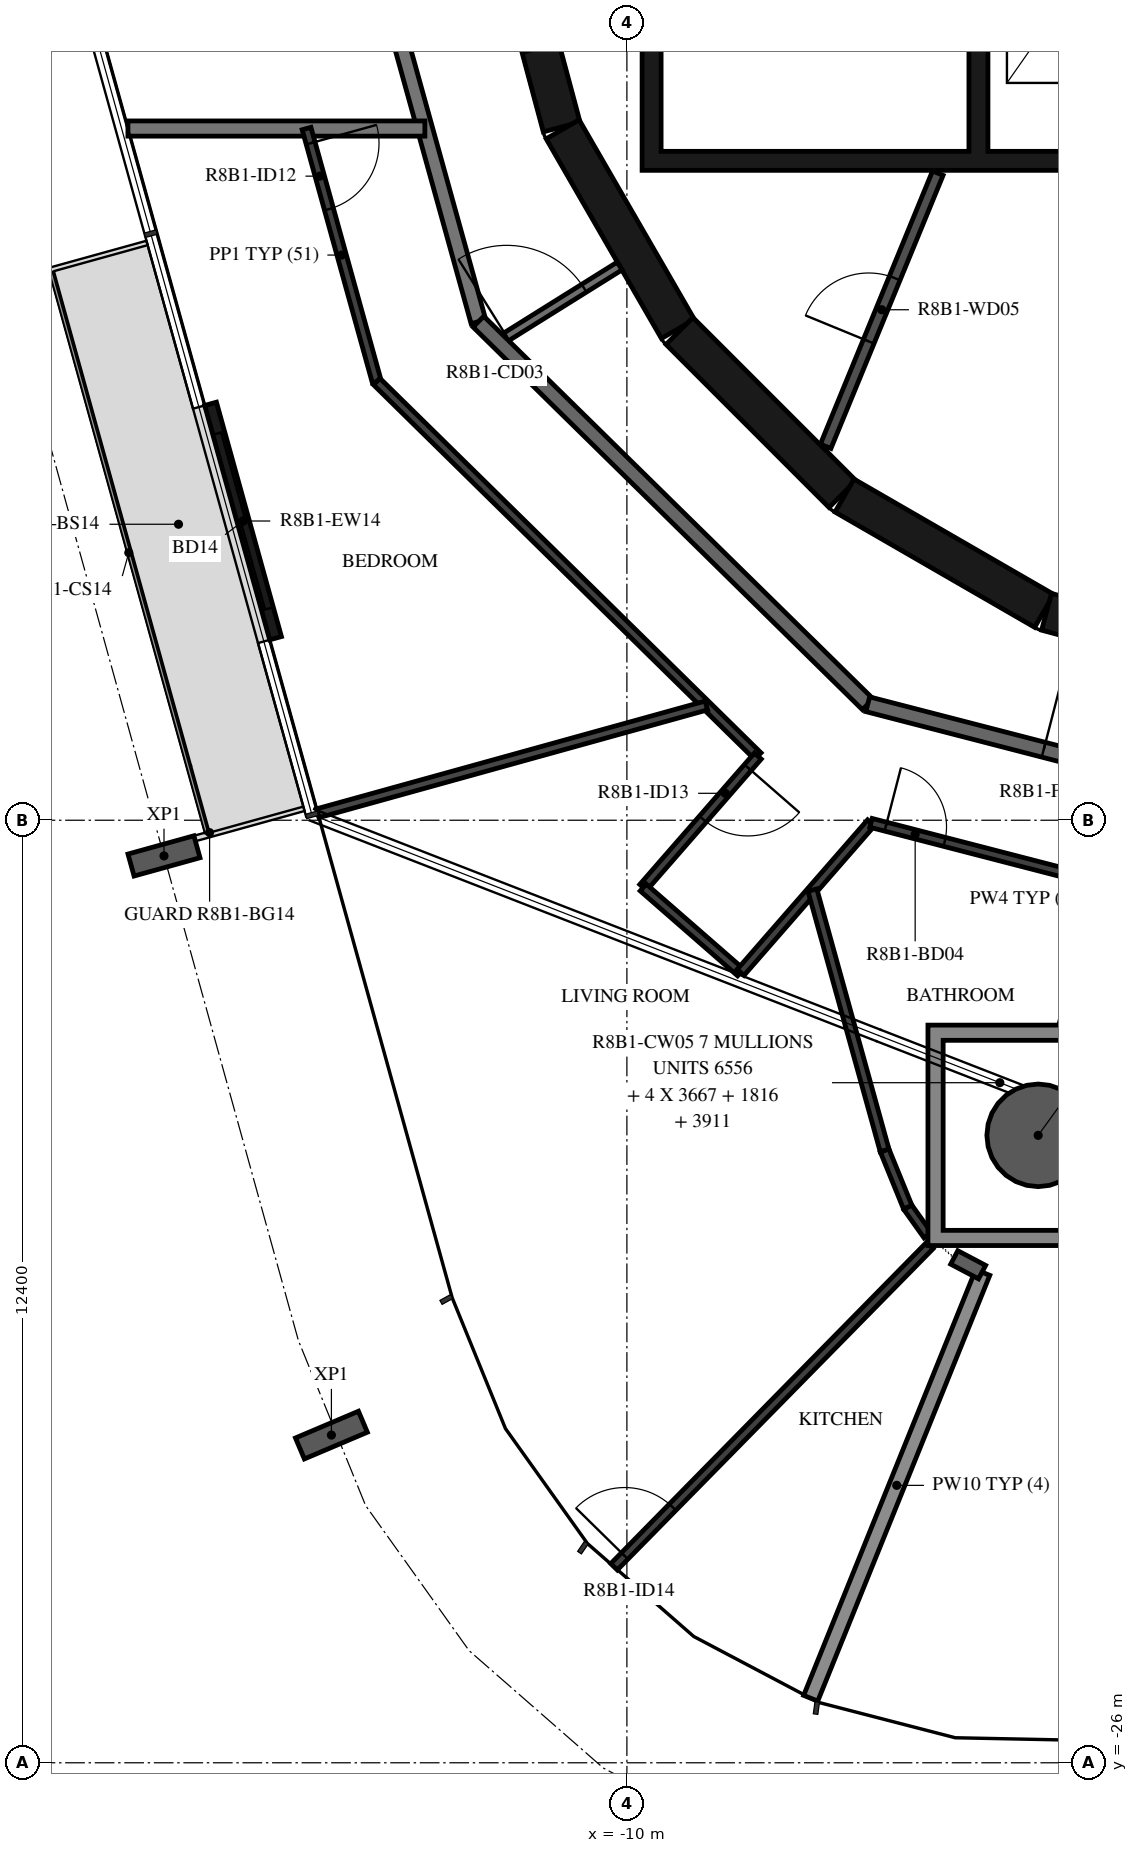
"""IFC4 building model, lengths in metres.
Left out: names, types, materials, properties, quantities, classifications, styles, units other than length and angle.
Written with IfcOpenShell. Run it as: python <this file> out.ifc"""

import sys

from ifc_helpers import new_model, si_unit, direction, frame, frame_2d, origin, origin_2d, place, context, subcontext, project, spatial, polyline, rectangle, hollow_circle, i_section, outline, extrude, element, fill, save


model = new_model("IFC4")
c1 = context("Model", 3, precision=1e-05, world=origin(), true_north=direction((0.0, 1.0)))
c2 = subcontext(c1, "Body", "Model", "MODEL_VIEW")
j1 = project(units=[si_unit("LENGTHUNIT", "METRE"), si_unit("PLANEANGLEUNIT", "RADIAN")], contexts=[c1])
p1 = place(None, origin())
s1 = spatial("IfcSite", under=j1, at=p1, CompositionType="ELEMENT")
p2 = place(p1, origin())
s2 = spatial("IfcBuilding", under=s1, at=p2, CompositionType="ELEMENT")
p3 = place(p2, frame((0.0, 0.0, 308.7)))
s3 = spatial("IfcBuildingStorey", under=s2, at=p3, CompositionType="ELEMENT", Elevation=308.7)
p4 = place(p3, frame((-4.589, -17.745, -0.38), z_axis=(0.0, 0.0, 1.0), x_axis=(1.0, 0.0, 0.0)))
e1 = element("IfcColumn", 1, at=p4, inside=s3, PredefinedType="COLUMN", context=c2, shape_type="SweptSolid", body=[
    extrude(hollow_circle(Radius=0.675, WallThickness=0.03, at=origin_2d()), origin(), (0.0, 0.0, 1.0), 3.5),
])
for number, where, z_axis, x_axis in (
    (2, (-16.09, -14.069, -0.38), (0.0, 0.0, 1.0), (-0.267, 0.964, 0.0)),
    (3, (-13.887, -21.689, -0.38), (0.0, 0.0, 1.0), (-0.39, 0.921, 0.0)),
):
    element("IfcColumn", number, at=place(p3, frame(where, z_axis=z_axis, x_axis=x_axis)), inside=s3, PredefinedType="COLUMN", context=c2, shape_type="SweptSolid", body=[
        extrude(i_section(OverallWidth=0.3, OverallDepth=0.9, WebThickness=0.019, FlangeThickness=0.035, FilletRadius=0.03, at=origin_2d()), origin(), (0.0, 0.0, 1.0), 3.5),
    ])
p5 = place(p3, frame((-15.477, -8.122, 0.0), z_axis=(0.0, 0.0, 1.0), x_axis=(0.267195229387, -0.963642417805, 0.0)))
e4 = element("IfcWall", 4, at=p5, inside=s3, PredefinedType="STANDARD", context=c2, shape_type="SweptSolid", body=[
    extrude(rectangle(XDim=3.2, YDim=0.16, at=frame_2d((1.6, 0.0))), origin(), (0.0, 0.0, 1.0), 3.12),
])
p6 = place(p5, frame((0.4, 0.0, 0.0)))
e5 = element("IfcOpeningElement", 5, at=p6, cuts=e4, PredefinedType="OPENING", context=c2, shape_type="SweptSolid", body=[
    extrude(rectangle(XDim=2.4, YDim=2.4, at=frame_2d((1.2, 1.2))), frame((0.0, 0.09, 0.0), z_axis=(0.0, -1.0, 0.0), x_axis=(1.0, 0.0, 0.0)), (0.0, 0.0, 1.0), 0.18),
])
p7 = place(p3, frame((-11.643, -1.55, 0.0), z_axis=(0.0, 0.0, 1.0), x_axis=(0.258734743916, -0.965948410781, 0.0)))
e6 = element("IfcWall", 6, at=p7, inside=s3, PredefinedType="SHEAR", context=c2, shape_type="SweptSolid", body=[
    extrude(rectangle(XDim=3.033, YDim=0.5, at=frame_2d((1.516, 0.0))), origin(), (0.0, 0.0, 1.0), 3.12),
])
p8 = place(p7, frame((1.066, 0.0, 0.0)))
e7 = element("IfcOpeningElement", 7, at=p8, cuts=e6, PredefinedType="OPENING", context=c2, shape_type="SweptSolid", body=[
    extrude(rectangle(XDim=0.9, YDim=2.1, at=frame_2d((0.45, 1.05))), frame((0.0, 0.26, 0.0), z_axis=(0.0, -1.0, 0.0), x_axis=(1.0, 0.0, 0.0)), (0.0, 0.0, 1.0), 0.52),
])
p9 = place(p3, frame((-10.845, -4.51, 0.0), z_axis=(0.0, 0.0, 1.0), x_axis=(0.500087131594, -0.865975092491, 0.0)))
e8 = element("IfcWall", 8, at=p9, inside=s3, PredefinedType="SHEAR", context=c2, shape_type="SweptSolid", body=[
    extrude(rectangle(XDim=3.033, YDim=0.5, at=frame_2d((1.516, 0.0))), origin(), (0.0, 0.0, 1.0), 3.12),
])
p10 = place(p3, frame((-9.308, -7.164, 0.0), z_axis=(0.0, 0.0, 1.0), x_axis=(0.707106781187, -0.707106781187, 0.0)))
e9 = element("IfcWall", 9, at=p10, inside=s3, PredefinedType="SHEAR", context=c2, shape_type="SweptSolid", body=[
    extrude(rectangle(XDim=3.032, YDim=0.5, at=frame_2d((1.516, 0.0))), origin(), (0.0, 0.0, 1.0), 3.12),
])
for number, where, z_axis, x_axis in (
    (10, (-7.137, -9.329, 0.0), (0.0, 0.0, 1.0), (0.866, -0.5, 0.0)),
    (11, (-4.479, -10.858, 0.0), (0.0, 0.0, 1.0), (0.966, -0.259, 0.0)),
):
    element("IfcWall", number, at=place(p3, frame(where, z_axis=z_axis, x_axis=x_axis)), inside=s3, PredefinedType="SHEAR", context=c2, shape_type="SweptSolid", body=[
        extrude(rectangle(XDim=3.033, YDim=0.5, at=frame_2d((1.516, 0.0))), origin(), (0.0, 0.0, 1.0), 3.12),
    ])
p11 = place(p3, origin())
e12 = element("IfcWall", 12, at=p11, inside=s3, PredefinedType="SHEAR", context=c2, shape_type="SweptSolid", body=[
    extrude(outline(polyline([(9.8, -5.05), (9.8, -4.8), (9.8, -1.9), (9.55, -1.9), (9.55, -4.8), (7.65, -4.8), (7.65, -1.9), (7.4, -1.9), (7.4, -4.8), (5.5, -4.8), (5.5, -1.9), (5.25, -1.9), (5.25, -4.8), (3.35, -4.8), (3.35, -1.9), (3.1, -1.9), (3.1, -4.8), (1.2, -4.8), (1.2, -1.9), (0.95, -1.9), (0.95, -4.8), (-0.95, -4.8), (-0.95, -1.9), (-1.2, -1.9), (-1.2, -4.8), (-3.1, -4.8), (-3.1, -1.9), (-3.35, -1.9), (-3.35, -4.8), (-5.25, -4.8), (-5.25, -1.9), (-5.5, -1.9), (-5.5, -4.8), (-9.55, -4.8), (-9.55, -1.9), (-9.8, -1.9), (-9.8, -4.8), (-9.8, -5.05), (9.8, -5.05)])), origin(), (0.0, 0.0, 1.0), 3.12),
])
p12 = place(p3, frame((-7.385, -8.681, 0.0), z_axis=(0.0, 0.0, 1.0), x_axis=(0.379804590409, 0.925066739811, 0.0)))
e13 = element("IfcWall", 13, at=p12, inside=s3, PredefinedType="PARTITIONING", context=c2, shape_type="SweptSolid", body=[
    extrude(rectangle(XDim=3.885, YDim=0.15, at=frame_2d((1.942, 0.0))), origin(), (0.0, 0.0, 1.0), 3.12),
])
p13 = place(p12, frame((1.493, 0.0, 0.0)))
e14 = element("IfcOpeningElement", 14, at=p13, cuts=e13, PredefinedType="OPENING", context=c2, shape_type="SweptSolid", body=[
    extrude(rectangle(XDim=0.9, YDim=2.1, at=frame_2d((0.45, 1.05))), frame((0.0, 0.085, 0.0), z_axis=(0.0, -1.0, 0.0), x_axis=(1.0, 0.0, 0.0)), (0.0, 0.0, 1.0), 0.17),
])
p14 = place(p3, frame((-11.687, -7.303, 0.0), z_axis=(0.0, 0.0, 1.0), x_axis=(0.848064094072, 0.529893661357, 0.0)))
e15 = element("IfcWall", 15, at=p14, inside=s3, PredefinedType="PARTITIONING", context=c2, shape_type="SweptSolid", body=[
    extrude(rectangle(XDim=1.876, YDim=0.12, at=frame_2d((0.938, 0.0))), origin(), (0.0, 0.0, 1.0), 3.12),
])
p15 = place(p14, frame((0.125, 0.0, 0.0)))
e16 = element("IfcOpeningElement", 16, at=p15, cuts=e15, PredefinedType="OPENING", context=c2, shape_type="SweptSolid", body=[
    extrude(rectangle(XDim=1.2, YDim=2.1, at=frame_2d((0.6, 1.05))), frame((0.0, 0.07, 0.0), z_axis=(0.0, -1.0, 0.0), x_axis=(1.0, 0.0, 0.0)), (0.0, 0.0, 1.0), 0.14),
])
p16 = place(p3, frame((-13.872, -0.121, 0.0), z_axis=(0.0, 0.0, 1.0), x_axis=(0.267254575108, -0.963625960674, 0.0)))
e17 = element("IfcWall", 17, at=p16, inside=s3, PredefinedType="STANDARD", context=c2, shape_type="SweptSolid", body=[
    extrude(rectangle(XDim=7.181, YDim=0.2, at=frame_2d((3.591, 0.0))), origin(), (0.0, 0.0, 1.0), 3.12),
])
p17 = place(p3, frame((-11.953, -7.041, 0.0), z_axis=(0.0, 0.0, 1.0), x_axis=(0.713250549143, -0.70090916255, 0.0)))
e18 = element("IfcWall", 18, at=p17, inside=s3, PredefinedType="STANDARD", context=c2, shape_type="SweptSolid", body=[
    extrude(rectangle(XDim=7.181, YDim=0.2, at=frame_2d((3.59, 0.0))), origin(), (0.0, 0.0, 1.0), 3.12),
])
p18 = place(p3, frame((-6.831, -12.074, 0.0), z_axis=(0.0, 0.0, 1.0), x_axis=(0.968144780225, -0.250391063186, 0.0)))
e19 = element("IfcWall", 19, at=p18, inside=s3, PredefinedType="STANDARD", context=c2, shape_type="SweptSolid", body=[
    extrude(rectangle(XDim=7.181, YDim=0.2, at=frame_2d((3.591, 0.0))), origin(), (0.0, 0.0, 1.0), 3.12),
])
p19 = place(p18, frame((2.39, 0.0, 0.0)))
e20 = element("IfcOpeningElement", 20, at=p19, cuts=e19, PredefinedType="OPENING", context=c2, shape_type="SweptSolid", body=[
    extrude(rectangle(XDim=1.0, YDim=2.1, at=frame_2d((0.5, 1.05))), frame((0.0, 0.11, 0.0), z_axis=(0.0, -1.0, 0.0), x_axis=(1.0, 0.0, 0.0)), (0.0, 0.0, 1.0), 0.22),
])
p20 = place(p18, frame((5.69, 0.0, 0.0)))
e21 = element("IfcOpeningElement", 21, at=p20, cuts=e19, PredefinedType="OPENING", context=c2, shape_type="SweptSolid", body=[
    extrude(rectangle(XDim=1.0, YDim=2.1, at=frame_2d((0.5, 1.05))), frame((0.0, 0.11, 0.0), z_axis=(0.0, -1.0, 0.0), x_axis=(1.0, 0.0, 0.0)), (0.0, 0.0, 1.0), 0.22),
])
p21 = place(p3, frame((-16.564, -4.5, 0.0), z_axis=(0.0, 0.0, 1.0), x_axis=(1.0, 0.0, 0.0)))
e22 = element("IfcWall", 22, at=p21, inside=s3, PredefinedType="STANDARD", context=c2, shape_type="SweptSolid", body=[
    extrude(rectangle(XDim=3.907, YDim=0.2, at=frame_2d((1.953, 0.0))), origin(), (0.0, 0.0, 1.0), 3.12),
])
p22 = place(p3, frame((-7.582, -25.151, 0.0), z_axis=(0.0, 0.0, 1.0), x_axis=(0.3746561435, 0.927163833493, 0.0)))
e23 = element("IfcWall", 23, at=p22, inside=s3, PredefinedType="STANDARD", context=c2, shape_type="SweptSolid", body=[
    extrude(rectangle(XDim=6.041, YDim=0.2, at=frame_2d((3.021, 0.0))), origin(), (0.0, 0.0, 1.0), 2.73),
])
p23 = place(p3, frame((-5.327, -19.545, 0.0), z_axis=(0.0, 0.0, 1.0), x_axis=(-0.884418577045, 0.466694525979, 0.0)))
e24 = element("IfcWall", 24, at=p23, inside=s3, PredefinedType="STANDARD", context=c2, shape_type="SweptSolid", body=[
    extrude(rectangle(XDim=0.414, YDim=0.2, at=frame_2d((0.207, 0.0))), origin(), (0.0, 0.0, 1.0), 3.12),
])
p24 = place(p3, frame((-14.214, -4.5, 0.0), z_axis=(0.0, 0.0, 1.0), x_axis=(0.267199167841, -0.963641325756, 0.0)))
e25 = element("IfcWall", 25, at=p24, inside=s3, PredefinedType="PARTITIONING", context=c2, shape_type="SweptSolid", body=[
    extrude(rectangle(XDim=3.455, YDim=0.12, at=frame_2d((1.727, 0.0))), origin(), (0.0, 0.0, 1.0), 3.12),
])
p25 = place(p24, frame((0.2, 0.0, 0.0)))
e26 = element("IfcOpeningElement", 26, at=p25, cuts=e25, PredefinedType="OPENING", context=c2, shape_type="SweptSolid", body=[
    extrude(rectangle(XDim=0.9, YDim=2.1, at=frame_2d((0.45, 1.05))), frame((0.0, 0.07, 0.0), z_axis=(0.0, -1.0, 0.0), x_axis=(1.0, 0.0, 0.0)), (0.0, 0.0, 1.0), 0.14),
])
p26 = place(p3, frame((-13.291, -7.829, 0.0), z_axis=(0.0, 0.0, 1.0), x_axis=(0.71326209988, -0.700897408238, 0.0)))
e27 = element("IfcWall", 27, at=p26, inside=s3, PredefinedType="PARTITIONING", context=c2, shape_type="SweptSolid", body=[
    extrude(rectangle(XDim=7.029, YDim=0.12, at=frame_2d((3.515, 0.0))), origin(), (0.0, 0.0, 1.0), 3.12),
])
p27 = place(p3, frame((-8.278, -12.756, 0.0), z_axis=(0.0, 0.0, 1.0), x_axis=(-0.657358463875, -0.753578031774, 0.0)))
e28 = element("IfcWall", 28, at=p27, inside=s3, PredefinedType="PARTITIONING", context=c2, shape_type="SweptSolid", body=[
    extrude(rectangle(XDim=2.294, YDim=0.12, at=frame_2d((1.147, 0.0))), origin(), (0.0, 0.0, 1.0), 3.12),
])
p28 = place(p27, frame((0.2, 0.0, 0.0)))
e29 = element("IfcOpeningElement", 29, at=p28, cuts=e28, PredefinedType="OPENING", context=c2, shape_type="SweptSolid", body=[
    extrude(rectangle(XDim=0.9, YDim=2.1, at=frame_2d((0.45, 1.05))), frame((0.0, 0.07, 0.0), z_axis=(0.0, -1.0, 0.0), x_axis=(1.0, 0.0, 0.0)), (0.0, 0.0, 1.0), 0.14),
])
p29 = place(p3, frame((-9.785, -14.484, 0.0), z_axis=(0.0, 0.0, 1.0), x_axis=(0.753643217927, -0.657283728745, 0.0)))
e30 = element("IfcWall", 30, at=p29, inside=s3, PredefinedType="PARTITIONING", context=c2, shape_type="SweptSolid", body=[
    extrude(rectangle(XDim=1.7, YDim=0.12, at=frame_2d((0.85, 0.0))), origin(), (0.0, 0.0, 1.0), 3.12),
])
p30 = place(p3, frame((-8.504, -15.602, 0.0), z_axis=(0.0, 0.0, 1.0), x_axis=(0.657298689015, 0.753630170189, 0.0)))
e31 = element("IfcWall", 31, at=p30, inside=s3, PredefinedType="PARTITIONING", context=c2, shape_type="SweptSolid", body=[
    extrude(rectangle(XDim=2.61, YDim=0.12, at=frame_2d((1.305, 0.0))), origin(), (0.0, 0.0, 1.0), 3.12),
])
p31 = place(p3, frame((-6.788, -13.635, 0.0), z_axis=(0.0, 0.0, 1.0), x_axis=(0.968142345176, -0.250400478189, 0.0)))
e32 = element("IfcWall", 32, at=p31, inside=s3, PredefinedType="PARTITIONING", context=c2, shape_type="SweptSolid", body=[
    extrude(rectangle(XDim=7.151, YDim=0.12, at=frame_2d((3.575, 0.0))), origin(), (0.0, 0.0, 1.0), 3.12),
])
p32 = place(p31, frame((0.2, 0.0, 0.0)))
e33 = element("IfcOpeningElement", 33, at=p32, cuts=e32, PredefinedType="OPENING", context=c2, shape_type="SweptSolid", body=[
    extrude(rectangle(XDim=0.8, YDim=2.1, at=frame_2d((0.4, 1.05))), frame((0.0, 0.07, 0.0), z_axis=(0.0, -1.0, 0.0), x_axis=(1.0, 0.0, 0.0)), (0.0, 0.0, 1.0), 0.14),
])
p33 = place(p31, frame((3.358, 0.0, 0.0)))
e34 = element("IfcOpeningElement", 34, at=p33, cuts=e32, PredefinedType="OPENING", context=c2, shape_type="SweptSolid", body=[
    extrude(rectangle(XDim=0.8, YDim=2.1, at=frame_2d((0.4, 1.05))), frame((0.0, 0.07, 0.0), z_axis=(0.0, -1.0, 0.0), x_axis=(1.0, 0.0, 0.0)), (0.0, 0.0, 1.0), 0.14),
])
p34 = place(p3, frame((-14.066, -13.508, 0.0), z_axis=(0.0, 0.0, 1.0), x_axis=(0.963634530082, 0.267223674913, 0.0)))
e35 = element("IfcWall", 35, at=p34, inside=s3, PredefinedType="PARTITIONING", context=c2, shape_type="SweptSolid", body=[
    extrude(rectangle(XDim=5.304, YDim=0.12, at=frame_2d((2.652, 0.0))), origin(), (0.0, 0.0, 1.0), 2.73),
])
p35 = place(p3, frame((-6.042, -19.061, 0.0), z_axis=(0.0, 0.0, 1.0), x_axis=(-0.580679627377, 0.814132157791, 0.0)))
e36 = element("IfcWall", 36, at=p35, inside=s3, PredefinedType="PARTITIONING", context=c2, shape_type="SweptSolid", body=[
    extrude(rectangle(XDim=0.455, YDim=0.12, at=frame_2d((0.228, 0.0))), origin(), (0.0, 0.0, 1.0), 3.12),
])
p36 = place(p3, frame((-6.306, -18.69, 0.0), z_axis=(0.0, 0.0, 1.0), x_axis=(-0.377123826076, 0.926162847347, 0.0)))
e37 = element("IfcWall", 37, at=p36, inside=s3, PredefinedType="PARTITIONING", context=c2, shape_type="SweptSolid", body=[
    extrude(rectangle(XDim=0.807, YDim=0.12, at=frame_2d((0.403, 0.0))), origin(), (0.0, 0.0, 1.0), 3.12),
])
p37 = place(p3, frame((-6.61, -17.943, 0.0), z_axis=(0.0, 0.0, 1.0), x_axis=(-0.267254066434, 0.96362610175, 0.0)))
e38 = element("IfcWall", 38, at=p37, inside=s3, PredefinedType="PARTITIONING", context=c2, shape_type="SweptSolid", body=[
    extrude(rectangle(XDim=3.553, YDim=0.12, at=frame_2d((1.777, 0.0))), origin(), (0.0, 0.0, 1.0), 3.12),
])
p38 = place(p3, frame((-10.169, -23.421, 0.0), z_axis=(0.0, 0.0, 1.0), x_axis=(0.70104569517, 0.713116353258, 0.0)))
e39 = element("IfcWall", 39, at=p38, inside=s3, PredefinedType="PARTITIONING", context=c2, shape_type="SweptSolid", body=[
    extrude(rectangle(XDim=5.926, YDim=0.12, at=frame_2d((2.963, 0.0))), origin(), (0.0, 0.0, 1.0), 3.12),
])
p39 = place(p38, frame((0.2, 0.0, 0.0)))
e40 = element("IfcOpeningElement", 40, at=p39, cuts=e39, PredefinedType="OPENING", context=c2, shape_type="SweptSolid", body=[
    extrude(rectangle(XDim=0.9, YDim=2.1, at=frame_2d((0.45, 1.05))), frame((0.0, 0.07, 0.0), z_axis=(0.0, -1.0, 0.0), x_axis=(1.0, 0.0, 0.0)), (0.0, 0.0, 1.0), 0.14),
])
p40 = place(p3, origin())
e41 = element("IfcWall", 41, at=p40, inside=s3, PredefinedType="STANDARD", context=c2, shape_type="SweptSolid", body=[
    extrude(outline(polyline([(-3.139, -16.295), (-3.139, -19.195), (-6.039, -19.195), (-6.039, -16.295), (-3.139, -16.295)]), holes=[polyline([(-5.839, -18.995), (-3.339, -18.995), (-3.339, -16.495), (-5.839, -16.495), (-5.839, -18.995)])]), origin(), (0.0, 0.0, 1.0), 3.12),
])
p41 = place(p6, origin())
e42 = element("IfcDoor", 42, at=p41, inside=s3, OperationType="DOUBLE_DOOR_SLIDING", PredefinedType="DOOR", context=c2, shape_type="SweptSolid", body=[
    extrude(rectangle(XDim=2.4, YDim=2.4, at=frame_2d((1.2, 1.2))), frame((0.0, 0.025, 0.0), z_axis=(0.0, -1.0, 0.0), x_axis=(1.0, 0.0, 0.0)), (0.0, 0.0, 1.0), 0.05),
])
fill(e5, e42)
p42 = place(p13, origin())
e43 = element("IfcDoor", 43, at=p42, inside=s3, OperationType="SINGLE_SWING_LEFT", PredefinedType="DOOR", context=c2, shape_type="SweptSolid", body=[
    extrude(rectangle(XDim=0.9, YDim=2.1, at=frame_2d((0.45, 1.05))), frame((0.0, 0.025, 0.0), z_axis=(0.0, -1.0, 0.0), x_axis=(1.0, 0.0, 0.0)), (0.0, 0.0, 1.0), 0.05),
])
fill(e14, e43)
p43 = place(p19, origin())
e44 = element("IfcDoor", 44, at=p43, inside=s3, OperationType="SINGLE_SWING_RIGHT", PredefinedType="DOOR", context=c2, shape_type="SweptSolid", body=[
    extrude(rectangle(XDim=1.0, YDim=2.1, at=frame_2d((0.5, 1.05))), frame((0.0, 0.025, 0.0), z_axis=(0.0, -1.0, 0.0), x_axis=(1.0, 0.0, 0.0)), (0.0, 0.0, 1.0), 0.05),
])
fill(e20, e44)
p44 = place(p25, origin())
e45 = element("IfcDoor", 45, at=p44, inside=s3, OperationType="SINGLE_SWING_RIGHT", PredefinedType="DOOR", context=c2, shape_type="SweptSolid", body=[
    extrude(rectangle(XDim=0.9, YDim=2.1, at=frame_2d((0.45, 1.05))), frame((0.0, 0.025, 0.0), z_axis=(0.0, -1.0, 0.0), x_axis=(1.0, 0.0, 0.0)), (0.0, 0.0, 1.0), 0.05),
])
fill(e26, e45)
p45 = place(p28, origin())
e46 = element("IfcDoor", 46, at=p45, inside=s3, OperationType="SINGLE_SWING_RIGHT", PredefinedType="DOOR", context=c2, shape_type="SweptSolid", body=[
    extrude(rectangle(XDim=0.9, YDim=2.1, at=frame_2d((0.45, 1.05))), frame((0.0, 0.025, 0.0), z_axis=(0.0, -1.0, 0.0), x_axis=(1.0, 0.0, 0.0)), (0.0, 0.0, 1.0), 0.05),
])
fill(e29, e46)
p46 = place(p32, origin())
e47 = element("IfcDoor", 47, at=p46, inside=s3, OperationType="SINGLE_SWING_RIGHT", PredefinedType="DOOR", context=c2, shape_type="SweptSolid", body=[
    extrude(rectangle(XDim=0.8, YDim=2.1, at=frame_2d((0.4, 1.05))), frame((0.0, 0.025, 0.0), z_axis=(0.0, -1.0, 0.0), x_axis=(1.0, 0.0, 0.0)), (0.0, 0.0, 1.0), 0.05),
])
fill(e33, e47)
p47 = place(p39, origin())
e48 = element("IfcDoor", 48, at=p47, inside=s3, OperationType="SINGLE_SWING_RIGHT", PredefinedType="DOOR", context=c2, shape_type="SweptSolid", body=[
    extrude(rectangle(XDim=0.9, YDim=2.1, at=frame_2d((0.45, 1.05))), frame((0.0, 0.025, 0.0), z_axis=(0.0, -1.0, 0.0), x_axis=(1.0, 0.0, 0.0)), (0.0, 0.0, 1.0), 0.05),
])
fill(e40, e48)
p48 = place(p15, origin())
e49 = element("IfcDoor", 49, at=p48, inside=s3, OperationType="DOUBLE_DOOR_SINGLE_SWING", PredefinedType="DOOR", context=c2, shape_type="SweptSolid", body=[
    extrude(rectangle(XDim=1.2, YDim=2.1, at=frame_2d((0.6, 1.05))), frame((0.0, 0.025, 0.0), z_axis=(0.0, -1.0, 0.0), x_axis=(1.0, 0.0, 0.0)), (0.0, 0.0, 1.0), 0.05),
])
fill(e16, e49)
save(model, sys.argv[1])
